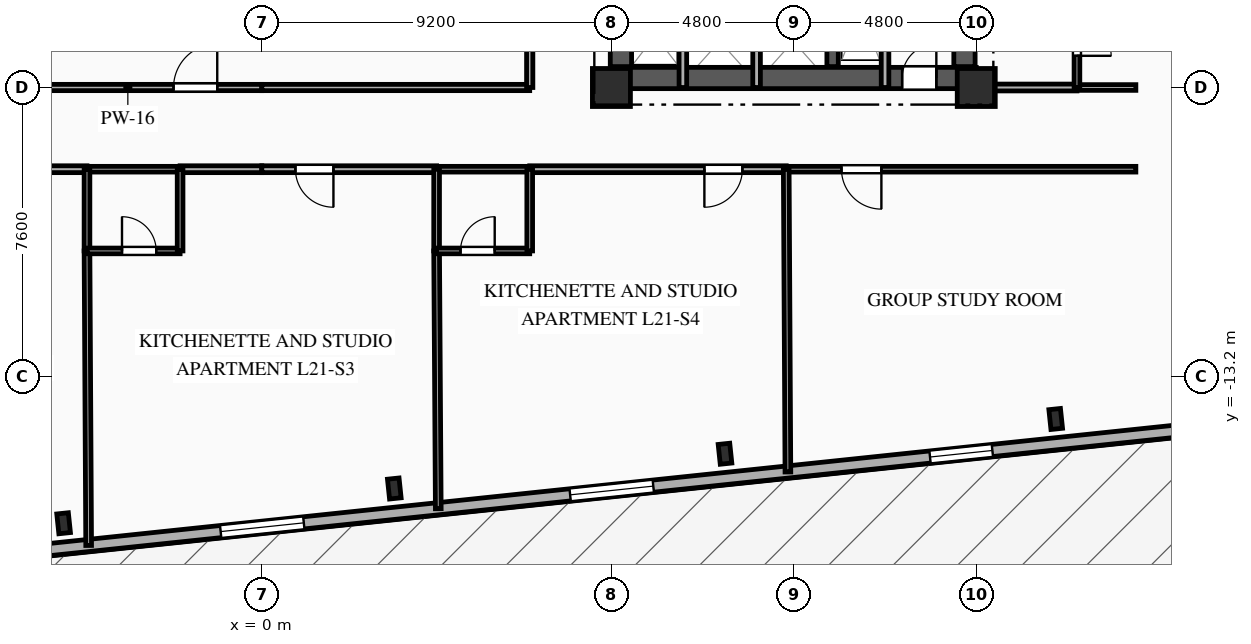
"""IFC4 building model, lengths in metres.
Left out: names, types, materials, properties, quantities, classifications, styles, units other than length and angle.
Written with IfcOpenShell. Run it as: python <this file> out.ifc"""

import sys

from ifc_helpers import new_model, si_unit, direction, frame, frame_2d, origin, origin_2d, place, context, subcontext, project, spatial, rectangle, i_section, extrude, element, fill, save


model = new_model("IFC4")
c1 = context("Model", 3, precision=1e-05, world=origin(), true_north=direction((0.0, 1.0)))
c2 = subcontext(c1, "Body", "Model", "MODEL_VIEW")
j1 = project(units=[si_unit("LENGTHUNIT", "METRE"), si_unit("PLANEANGLEUNIT", "RADIAN")], contexts=[c1])
p1 = place(None, origin())
s1 = spatial("IfcSite", under=j1, at=p1, CompositionType="ELEMENT")
p2 = place(p1, origin())
s2 = spatial("IfcBuilding", under=s1, at=p2, CompositionType="ELEMENT")
p3 = place(p2, frame((0.0, 0.0, 79.0)))
s3 = spatial("IfcBuildingStorey", under=s2, at=p3, CompositionType="ELEMENT", Elevation=79.0)
for number, where, z_axis, x_axis in (
    (1, (9.2, -5.6, 0.0), (0.0, 0.0, 1.0), (1.0, 0.0, 0.0)),
    (2, (18.8, -5.6, 0.0), (0.0, 0.0, 1.0), (1.0, 0.0, 0.0)),
):
    element("IfcColumn", number, at=place(p3, frame(where, z_axis=z_axis, x_axis=x_axis)), inside=s3, PredefinedType="COLUMN", context=c2, shape_type="SweptSolid", body=[
        extrude(rectangle(XDim=1.0, YDim=1.0, at=origin_2d()), origin(), (0.0, 0.0, 1.0), 3.35),
    ])
for number, where, z_axis, x_axis in (
    (3, (-5.215, -17.066, 0.0), (0.0, 0.0, 1.0), (0.995, 0.105, 0.0)),
    (4, (3.487, -16.151, 0.0), (0.0, 0.0, 1.0), (0.995, 0.105, 0.0)),
    (5, (12.189, -15.237, 0.0), (0.0, 0.0, 1.0), (0.995, 0.105, 0.0)),
    (6, (20.891, -14.322, 0.0), (0.0, 0.0, 1.0), (0.995, 0.105, 0.0)),
):
    element("IfcColumn", number, at=place(p3, frame(where, z_axis=z_axis, x_axis=x_axis)), inside=s3, PredefinedType="COLUMN", context=c2, shape_type="SweptSolid", body=[
        extrude(i_section(OverallWidth=0.306, OverallDepth=0.524, WebThickness=0.021, FlangeThickness=0.04, FilletRadius=0.027, at=origin_2d()), origin(), (0.0, 0.0, 1.0), 3.35),
    ])
p4 = place(p3, frame((30.307, -13.986, 0.0), z_axis=(0.0, 0.0, 1.0), x_axis=(-0.994521628355, -0.104531003701, 0.0)))
e7 = element("IfcWall", 7, at=p4, inside=s3, PredefinedType="SOLIDWALL", context=c2, shape_type="SweptSolid", body=[
    extrude(rectangle(XDim=53.8, YDim=0.32, at=frame_2d((26.9, 0.0))), origin(), (0.0, 0.0, 1.0), 3.045),
])
p5 = place(p4, frame((11.144, 0.0, 0.85)))
e8 = element("IfcOpeningElement", 8, at=p5, cuts=e7, PredefinedType="OPENING", context=c2, shape_type="SweptSolid", body=[
    extrude(rectangle(XDim=1.65, YDim=1.85, at=frame_2d((0.825, 0.925))), frame((0.0, 0.17, 0.0), z_axis=(0.0, -1.0, 0.0), x_axis=(1.0, 0.0, 0.0)), (0.0, 0.0, 1.0), 0.34),
])
p6 = place(p4, frame((20.116, 0.0, 0.85)))
e9 = element("IfcOpeningElement", 9, at=p6, cuts=e7, PredefinedType="OPENING", context=c2, shape_type="SweptSolid", body=[
    extrude(rectangle(XDim=2.2, YDim=1.85, at=frame_2d((1.1, 0.925))), frame((0.0, 0.17, 0.0), z_axis=(0.0, -1.0, 0.0), x_axis=(1.0, 0.0, 0.0)), (0.0, 0.0, 1.0), 0.34),
])
p7 = place(p4, frame((29.363, 0.0, 0.85)))
e10 = element("IfcOpeningElement", 10, at=p7, cuts=e7, PredefinedType="OPENING", context=c2, shape_type="SweptSolid", body=[
    extrude(rectangle(XDim=2.2, YDim=1.85, at=frame_2d((1.1, 0.925))), frame((0.0, 0.17, 0.0), z_axis=(0.0, -1.0, 0.0), x_axis=(1.0, 0.0, 0.0)), (0.0, 0.0, 1.0), 0.34),
])
p8 = place(p4, frame((38.61, 0.0, 0.85)))
e11 = element("IfcOpeningElement", 11, at=p8, cuts=e7, PredefinedType="OPENING", context=c2, shape_type="SweptSolid", body=[
    extrude(rectangle(XDim=2.2, YDim=1.85, at=frame_2d((1.1, 0.925))), frame((0.0, 0.17, 0.0), z_axis=(0.0, -1.0, 0.0), x_axis=(1.0, 0.0, 0.0)), (0.0, 0.0, 1.0), 0.34),
])
p9 = place(p4, frame((45.85, 0.0, 0.85)))
e12 = element("IfcOpeningElement", 12, at=p9, cuts=e7, PredefinedType="OPENING", context=c2, shape_type="SweptSolid", body=[
    extrude(rectangle(XDim=1.65, YDim=1.85, at=frame_2d((0.825, 0.925))), frame((0.0, 0.17, 0.0), z_axis=(0.0, -1.0, 0.0), x_axis=(1.0, 0.0, 0.0)), (0.0, 0.0, 1.0), 0.34),
])
p10 = place(p4, frame((50.373, 0.0, 0.85)))
e13 = element("IfcOpeningElement", 13, at=p10, cuts=e7, PredefinedType="OPENING", context=c2, shape_type="SweptSolid", body=[
    extrude(rectangle(XDim=1.65, YDim=1.85, at=frame_2d((0.825, 0.925))), frame((0.0, 0.17, 0.0), z_axis=(0.0, -1.0, 0.0), x_axis=(1.0, 0.0, 0.0)), (0.0, 0.0, 1.0), 0.34),
])
p11 = place(p3, frame((9.2, -5.35, 0.0), z_axis=(0.0, 0.0, 1.0), x_axis=(1.0, 0.0, 0.0)))
e14 = element("IfcWall", 14, at=p11, inside=s3, PredefinedType="SHEAR", context=c2, shape_type="SweptSolid", body=[
    extrude(rectangle(XDim=9.6, YDim=0.56, at=frame_2d((4.8, 0.0))), origin(), (0.0, 0.0, 1.0), 3.045),
])
p12 = place(p11, frame((7.65, 0.0, 0.0)))
e15 = element("IfcOpeningElement", 15, at=p12, cuts=e14, PredefinedType="OPENING", context=c2, shape_type="SweptSolid", body=[
    extrude(rectangle(XDim=0.9, YDim=2.1, at=frame_2d((0.45, 1.05))), frame((0.0, 0.29, 0.0), z_axis=(0.0, -1.0, 0.0), x_axis=(1.0, 0.0, 0.0)), (0.0, 0.0, 1.0), 0.58),
])
p13 = place(p3, frame((9.45, -5.05, 0.0), z_axis=(0.0, 0.0, 1.0), x_axis=(0.0, 1.0, 0.0)))
e16 = element("IfcWall", 16, at=p13, inside=s3, PredefinedType="SHEAR", context=c2, shape_type="SweptSolid", body=[
    extrude(rectangle(XDim=10.1, YDim=0.56, at=frame_2d((5.05, 0.0))), origin(), (0.0, 0.0, 1.0), 3.045),
])
p14 = place(p13, frame((7.15, 0.0, 0.0)))
e17 = element("IfcOpeningElement", 17, at=p14, cuts=e16, PredefinedType="OPENING", context=c2, shape_type="SweptSolid", body=[
    extrude(rectangle(XDim=0.9, YDim=2.1, at=frame_2d((0.45, 1.05))), frame((0.0, 0.29, 0.0), z_axis=(0.0, -1.0, 0.0), x_axis=(1.0, 0.0, 0.0)), (0.0, 0.0, 1.0), 0.58),
])
p15 = place(p13, frame((2.4, 0.0, 0.0)))
e18 = element("IfcOpeningElement", 18, at=p15, cuts=e16, PredefinedType="OPENING", context=c2, shape_type="SweptSolid", body=[
    extrude(rectangle(XDim=1.2, YDim=2.15, at=frame_2d((0.6, 1.075))), frame((0.0, 0.29, 0.0), z_axis=(0.0, -1.0, 0.0), x_axis=(1.0, 0.0, 0.0)), (0.0, 0.0, 1.0), 0.58),
])
p16 = place(p3, frame((18.49, -5.05, 0.0), z_axis=(0.0, 0.0, 1.0), x_axis=(0.0, 1.0, 0.0)))
e19 = element("IfcWall", 19, at=p16, inside=s3, PredefinedType="SHEAR", context=c2, shape_type="SweptSolid", body=[
    extrude(rectangle(XDim=10.1, YDim=0.56, at=frame_2d((5.05, 0.0))), origin(), (0.0, 0.0, 1.0), 3.045),
])
p17 = place(p3, frame((15.02, -5.05, 0.0), z_axis=(0.0, 0.0, 1.0), x_axis=(0.0, 1.0, 0.0)))
e20 = element("IfcWall", 20, at=p17, inside=s3, PredefinedType="SHEAR", context=c2, shape_type="SweptSolid", body=[
    extrude(rectangle(XDim=10.1, YDim=0.3, at=frame_2d((5.05, 0.0))), origin(), (0.0, 0.0, 1.0), 3.045),
])
p18 = place(p3, frame((16.4, -2.11, 0.0), z_axis=(0.0, 0.0, 1.0), x_axis=(0.0, -1.0, 0.0)))
e21 = element("IfcWall", 21, at=p18, inside=s3, PredefinedType="PARTITIONING", context=c2, shape_type="SweptSolid", body=[
    extrude(rectangle(XDim=3.49, YDim=0.2, at=frame_2d((1.745, 0.0))), origin(), (0.0, 0.0, 1.0), 3.045),
])
for number, where, z_axis, x_axis in (
    (22, (11.08, -5.6, 0.0), (0.0, 0.0, 1.0), (0.0, 1.0, 0.0)),
    (23, (13.02, -5.6, 0.0), (0.0, 0.0, 1.0), (0.0, 1.0, 0.0)),
):
    element("IfcWall", number, at=place(p3, frame(where, z_axis=z_axis, x_axis=x_axis)), inside=s3, PredefinedType="PARTITIONING", context=c2, shape_type="SweptSolid", body=[
        extrude(rectangle(XDim=2.25, YDim=0.2, at=frame_2d((1.125, 0.0))), origin(), (0.0, 0.0, 1.0), 3.045),
    ])
p19 = place(p3, frame((-4.6, -7.75, 0.0), z_axis=(0.0, 0.0, 1.0), x_axis=(-1.0, 0.0, 0.0)))
e24 = element("IfcWall", 24, at=p19, inside=s3, PredefinedType="PARTITIONING", context=c2, shape_type="SweptSolid", body=[
    extrude(rectangle(XDim=6.75, YDim=0.18, at=frame_2d((3.375, 0.0))), origin(), (0.0, 0.0, 1.0), 3.045),
])
p20 = place(p19, frame((1.154, 0.0, 0.0)))
e25 = element("IfcOpeningElement", 25, at=p20, cuts=e24, PredefinedType="OPENING", context=c2, shape_type="SweptSolid", body=[
    extrude(rectangle(XDim=1.0, YDim=2.15, at=frame_2d((0.5, 1.075))), frame((0.0, 0.1, 0.0), z_axis=(0.0, -1.0, 0.0), x_axis=(1.0, 0.0, 0.0)), (0.0, 0.0, 1.0), 0.2),
])
p21 = place(p3, frame((0.0, -7.75, 0.0), z_axis=(0.0, 0.0, 1.0), x_axis=(-1.0, 0.0, 0.0)))
e26 = element("IfcWall", 26, at=p21, inside=s3, PredefinedType="PARTITIONING", context=c2, shape_type="SweptSolid", body=[
    extrude(rectangle(XDim=2.15, YDim=0.18, at=frame_2d((1.075, 0.0))), origin(), (0.0, 0.0, 1.0), 3.045),
])
p22 = place(p3, frame((-2.15, -7.75, 0.0), z_axis=(0.0, 0.0, 1.0), x_axis=(-1.0, 0.0, 0.0)))
e27 = element("IfcWall", 27, at=p22, inside=s3, PredefinedType="PLUMBINGWALL", context=c2, shape_type="SweptSolid", body=[
    extrude(rectangle(XDim=2.45, YDim=0.15, at=frame_2d((1.225, 0.0))), origin(), (0.0, 0.0, 1.0), 3.045),
])
p23 = place(p3, frame((-7.05, -5.6, 0.0), z_axis=(0.0, 0.0, 1.0), x_axis=(1.0, 0.0, 0.0)))
e28 = element("IfcWall", 28, at=p23, inside=s3, PredefinedType="PARTITIONING", context=c2, shape_type="SweptSolid", body=[
    extrude(rectangle(XDim=7.05, YDim=0.165, at=frame_2d((3.525, 0.0))), origin(), (0.0, 0.0, 1.0), 2.53),
])
p24 = place(p23, frame((4.728, 0.0, 0.0)))
e29 = element("IfcOpeningElement", 29, at=p24, cuts=e28, PredefinedType="OPENING", context=c2, shape_type="SweptSolid", body=[
    extrude(rectangle(XDim=1.15, YDim=2.15, at=frame_2d((0.575, 1.075))), frame((0.0, 0.093, 0.0), z_axis=(0.0, -1.0, 0.0), x_axis=(1.0, 0.0, 0.0)), (0.0, 0.0, 1.0), 0.185),
])
p25 = place(p3, frame((18.8, -5.6, 0.0), z_axis=(0.0, 0.0, 1.0), x_axis=(1.0, 0.0, 0.0)))
e30 = element("IfcWall", 30, at=p25, inside=s3, PredefinedType="PARTITIONING", context=c2, shape_type="SweptSolid", body=[
    extrude(rectangle(XDim=2.65, YDim=0.18, at=frame_2d((1.325, 0.0))), origin(), (0.0, 0.0, 1.0), 2.53),
])
p26 = place(p3, frame((21.45, -5.6, 0.0), z_axis=(0.0, 0.0, 1.0), x_axis=(1.0, 0.0, 0.0)))
e31 = element("IfcWall", 31, at=p26, inside=s3, PredefinedType="PLUMBINGWALL", context=c2, shape_type="SweptSolid", body=[
    extrude(rectangle(XDim=1.55, YDim=0.15, at=frame_2d((0.775, 0.0))), origin(), (0.0, 0.0, 1.0), 3.045),
])
p27 = place(p3, frame((4.6, -7.75, 0.0), z_axis=(0.0, 0.0, 1.0), x_axis=(-1.0, 0.0, 0.0)))
e32 = element("IfcWall", 32, at=p27, inside=s3, PredefinedType="PARTITIONING", context=c2, shape_type="SweptSolid", body=[
    extrude(rectangle(XDim=4.6, YDim=0.18, at=frame_2d((2.3, 0.0))), origin(), (0.0, 0.0, 1.0), 3.045),
])
p28 = place(p27, frame((2.715, 0.0, 0.0)))
e33 = element("IfcOpeningElement", 33, at=p28, cuts=e32, PredefinedType="OPENING", context=c2, shape_type="SweptSolid", body=[
    extrude(rectangle(XDim=1.0, YDim=2.15, at=frame_2d((0.5, 1.075))), frame((0.0, 0.1, 0.0), z_axis=(0.0, -1.0, 0.0), x_axis=(1.0, 0.0, 0.0)), (0.0, 0.0, 1.0), 0.2),
])
p29 = place(p3, frame((13.8, -7.75, 0.0), z_axis=(0.0, 0.0, 1.0), x_axis=(-1.0, 0.0, 0.0)))
e34 = element("IfcWall", 34, at=p29, inside=s3, PredefinedType="PARTITIONING", context=c2, shape_type="SweptSolid", body=[
    extrude(rectangle(XDim=6.75, YDim=0.18, at=frame_2d((3.375, 0.0))), origin(), (0.0, 0.0, 1.0), 3.045),
])
p30 = place(p29, frame((1.154, 0.0, 0.0)))
e35 = element("IfcOpeningElement", 35, at=p30, cuts=e34, PredefinedType="OPENING", context=c2, shape_type="SweptSolid", body=[
    extrude(rectangle(XDim=1.0, YDim=2.15, at=frame_2d((0.5, 1.075))), frame((0.0, 0.1, 0.0), z_axis=(0.0, -1.0, 0.0), x_axis=(1.0, 0.0, 0.0)), (0.0, 0.0, 1.0), 0.2),
])
p31 = place(p3, frame((7.05, -7.75, 0.0), z_axis=(0.0, 0.0, 1.0), x_axis=(-1.0, 0.0, 0.0)))
e36 = element("IfcWall", 36, at=p31, inside=s3, PredefinedType="PLUMBINGWALL", context=c2, shape_type="SweptSolid", body=[
    extrude(rectangle(XDim=2.45, YDim=0.15, at=frame_2d((1.225, 0.0))), origin(), (0.0, 0.0, 1.0), 3.045),
])
p32 = place(p3, frame((23.0, -7.75, 0.0), z_axis=(0.0, 0.0, 1.0), x_axis=(-1.0, 0.0, 0.0)))
e37 = element("IfcWall", 37, at=p32, inside=s3, PredefinedType="PARTITIONING", context=c2, shape_type="SweptSolid", body=[
    extrude(rectangle(XDim=9.2, YDim=0.15, at=frame_2d((4.6, 0.0))), origin(), (0.0, 0.0, 1.0), 3.045),
])
p33 = place(p32, frame((6.696, 0.0, 0.0)))
e38 = element("IfcOpeningElement", 38, at=p33, cuts=e37, PredefinedType="OPENING", context=c2, shape_type="SweptSolid", body=[
    extrude(rectangle(XDim=1.05, YDim=2.15, at=frame_2d((0.525, 1.075))), frame((0.0, 0.085, 0.0), z_axis=(0.0, -1.0, 0.0), x_axis=(1.0, 0.0, 0.0)), (0.0, 0.0, 1.0), 0.17),
])
p34 = place(p3, frame((0.0, -5.6, 0.0), z_axis=(0.0, 0.0, 1.0), x_axis=(1.0, 0.0, 0.0)))
e39 = element("IfcWall", 39, at=p34, inside=s3, PredefinedType="PARTITIONING", context=c2, shape_type="SweptSolid", body=[
    extrude(rectangle(XDim=7.05, YDim=0.165, at=frame_2d((3.525, 0.0))), origin(), (0.0, 0.0, 1.0), 2.53),
])
p35 = place(p3, frame((7.05, -5.6, 0.0), z_axis=(0.0, 0.0, 1.0), x_axis=(0.0, 1.0, 0.0)))
e40 = element("IfcWall", 40, at=p35, inside=s3, PredefinedType="PARTITIONING", context=c2, shape_type="SweptSolid", body=[
    extrude(rectangle(XDim=7.05, YDim=0.165, at=frame_2d((3.525, 0.0))), origin(), (0.0, 0.0, 1.0), 3.045),
])
p36 = place(p3, frame((21.45, -3.25, 0.0), z_axis=(0.0, 0.0, 1.0), x_axis=(0.0, -1.0, 0.0)))
e41 = element("IfcWall", 41, at=p36, inside=s3, PredefinedType="PLUMBINGWALL", context=c2, shape_type="SweptSolid", body=[
    extrude(rectangle(XDim=2.35, YDim=0.15, at=frame_2d((1.175, 0.0))), origin(), (0.0, 0.0, 1.0), 3.045),
])
p37 = place(p36, frame((0.616, 0.0, 0.0)))
e42 = element("IfcOpeningElement", 42, at=p37, cuts=e41, PredefinedType="OPENING", context=c2, shape_type="SweptSolid", body=[
    extrude(rectangle(XDim=0.9, YDim=2.1, at=frame_2d((0.45, 1.05))), frame((0.0, 0.085, 0.0), z_axis=(0.0, -1.0, 0.0), x_axis=(1.0, 0.0, 0.0)), (0.0, 0.0, 1.0), 0.17),
])
p38 = place(p3, frame((-4.6, -9.9, 0.0), z_axis=(0.0, 0.0, 1.0), x_axis=(0.005670271746, -0.99998392388, 0.0)))
e43 = element("IfcWall", 43, at=p38, inside=s3, PredefinedType="PARTITIONING", context=c2, shape_type="SweptSolid", body=[
    extrude(rectangle(XDim=7.75, YDim=0.15, at=frame_2d((3.875, 0.0))), origin(), (0.0, 0.0, 1.0), 3.045),
])
p39 = place(p3, frame((-4.6, -7.75, 0.0), z_axis=(0.0, 0.0, 1.0), x_axis=(0.0, -1.0, 0.0)))
e44 = element("IfcWall", 44, at=p39, inside=s3, PredefinedType="PLUMBINGWALL", context=c2, shape_type="SweptSolid", body=[
    extrude(rectangle(XDim=2.15, YDim=0.15, at=frame_2d((1.075, 0.0))), origin(), (0.0, 0.0, 1.0), 3.045),
])
p40 = place(p3, frame((-4.6, -9.9, 0.0), z_axis=(0.0, 0.0, 1.0), x_axis=(1.0, 0.0, 0.0)))
e45 = element("IfcWall", 45, at=p40, inside=s3, PredefinedType="PLUMBINGWALL", context=c2, shape_type="SweptSolid", body=[
    extrude(rectangle(XDim=2.45, YDim=0.15, at=frame_2d((1.225, 0.0))), origin(), (0.0, 0.0, 1.0), 3.045),
])
p41 = place(p40, frame((0.921, 0.0, 0.0)))
e46 = element("IfcOpeningElement", 46, at=p41, cuts=e45, PredefinedType="OPENING", context=c2, shape_type="SweptSolid", body=[
    extrude(rectangle(XDim=0.9, YDim=2.1, at=frame_2d((0.45, 1.05))), frame((0.0, 0.085, 0.0), z_axis=(0.0, -1.0, 0.0), x_axis=(1.0, 0.0, 0.0)), (0.0, 0.0, 1.0), 0.17),
])
p42 = place(p3, frame((-2.15, -9.9, 0.0), z_axis=(0.0, 0.0, 1.0), x_axis=(0.0, 1.0, 0.0)))
e47 = element("IfcWall", 47, at=p42, inside=s3, PredefinedType="PLUMBINGWALL", context=c2, shape_type="SweptSolid", body=[
    extrude(rectangle(XDim=2.15, YDim=0.15, at=frame_2d((1.075, 0.0))), origin(), (0.0, 0.0, 1.0), 3.045),
])
p43 = place(p3, frame((4.6, -9.9, 0.0), z_axis=(0.0, 0.0, 1.0), x_axis=(0.006442423167, -0.999979247377, 0.0)))
e48 = element("IfcWall", 48, at=p43, inside=s3, PredefinedType="PARTITIONING", context=c2, shape_type="SweptSolid", body=[
    extrude(rectangle(XDim=6.783, YDim=0.15, at=frame_2d((3.392, 0.0))), origin(), (0.0, 0.0, 1.0), 3.045),
])
p44 = place(p3, frame((4.6, -7.75, 0.0), z_axis=(0.0, 0.0, 1.0), x_axis=(0.0, -1.0, 0.0)))
e49 = element("IfcWall", 49, at=p44, inside=s3, PredefinedType="PLUMBINGWALL", context=c2, shape_type="SweptSolid", body=[
    extrude(rectangle(XDim=2.15, YDim=0.15, at=frame_2d((1.075, 0.0))), origin(), (0.0, 0.0, 1.0), 3.045),
])
p45 = place(p3, frame((4.6, -9.9, 0.0), z_axis=(0.0, 0.0, 1.0), x_axis=(1.0, 0.0, 0.0)))
e50 = element("IfcWall", 50, at=p45, inside=s3, PredefinedType="PLUMBINGWALL", context=c2, shape_type="SweptSolid", body=[
    extrude(rectangle(XDim=2.45, YDim=0.15, at=frame_2d((1.225, 0.0))), origin(), (0.0, 0.0, 1.0), 3.045),
])
p46 = place(p45, frame((0.629, 0.0, 0.0)))
e51 = element("IfcOpeningElement", 51, at=p46, cuts=e50, PredefinedType="OPENING", context=c2, shape_type="SweptSolid", body=[
    extrude(rectangle(XDim=0.9, YDim=2.1, at=frame_2d((0.45, 1.05))), frame((0.0, 0.085, 0.0), z_axis=(0.0, -1.0, 0.0), x_axis=(1.0, 0.0, 0.0)), (0.0, 0.0, 1.0), 0.17),
])
p47 = place(p3, frame((7.05, -9.9, 0.0), z_axis=(0.0, 0.0, 1.0), x_axis=(0.0, 1.0, 0.0)))
e52 = element("IfcWall", 52, at=p47, inside=s3, PredefinedType="PLUMBINGWALL", context=c2, shape_type="SweptSolid", body=[
    extrude(rectangle(XDim=2.15, YDim=0.15, at=frame_2d((1.075, 0.0))), origin(), (0.0, 0.0, 1.0), 3.045),
])
p48 = place(p3, frame((13.8, -7.75, 0.0), z_axis=(0.0, 0.0, 1.0), x_axis=(0.005516481079, -0.999984784102, 0.0)))
e53 = element("IfcWall", 53, at=p48, inside=s3, PredefinedType="PARTITIONING", context=c2, shape_type="SweptSolid", body=[
    extrude(rectangle(XDim=7.966, YDim=0.15, at=frame_2d((3.983, 0.0))), origin(), (0.0, 0.0, 1.0), 3.045),
])
p49 = place(p5, origin())
e54 = element("IfcWindow", 54, at=p49, inside=s3, PartitioningType="SINGLE_PANEL", PredefinedType="WINDOW", context=c2, shape_type="SweptSolid", body=[
    extrude(rectangle(XDim=1.65, YDim=1.85, at=frame_2d((0.825, 0.925))), frame((0.0, 0.03, 0.0), z_axis=(0.0, -1.0, 0.0), x_axis=(1.0, 0.0, 0.0)), (0.0, 0.0, 1.0), 0.06),
])
fill(e8, e54)
p50 = place(p6, origin())
e55 = element("IfcWindow", 55, at=p50, inside=s3, PartitioningType="SINGLE_PANEL", PredefinedType="WINDOW", context=c2, shape_type="SweptSolid", body=[
    extrude(rectangle(XDim=2.2, YDim=1.85, at=frame_2d((1.1, 0.925))), frame((0.0, 0.03, 0.0), z_axis=(0.0, -1.0, 0.0), x_axis=(1.0, 0.0, 0.0)), (0.0, 0.0, 1.0), 0.06),
])
fill(e9, e55)
p51 = place(p7, origin())
e56 = element("IfcWindow", 56, at=p51, inside=s3, PartitioningType="SINGLE_PANEL", PredefinedType="WINDOW", context=c2, shape_type="SweptSolid", body=[
    extrude(rectangle(XDim=2.2, YDim=1.85, at=frame_2d((1.1, 0.925))), frame((0.0, 0.03, 0.0), z_axis=(0.0, -1.0, 0.0), x_axis=(1.0, 0.0, 0.0)), (0.0, 0.0, 1.0), 0.06),
])
fill(e10, e56)
p52 = place(p12, origin())
e57 = element("IfcDoor", 57, at=p52, inside=s3, OperationType="SINGLE_SWING_RIGHT", PredefinedType="DOOR", context=c2, shape_type="SweptSolid", body=[
    extrude(rectangle(XDim=0.9, YDim=2.1, at=frame_2d((0.45, 1.05))), frame((0.0, 0.025, 0.0), z_axis=(0.0, -1.0, 0.0), x_axis=(1.0, 0.0, 0.0)), (0.0, 0.0, 1.0), 0.05),
])
fill(e15, e57)
p53 = place(p24, origin())
e58 = element("IfcDoor", 58, at=p53, inside=s3, OperationType="SINGLE_SWING_RIGHT", PredefinedType="DOOR", context=c2, shape_type="SweptSolid", body=[
    extrude(rectangle(XDim=1.15, YDim=2.15, at=frame_2d((0.575, 1.075))), frame((0.0, 0.025, 0.0), z_axis=(0.0, -1.0, 0.0), x_axis=(1.0, 0.0, 0.0)), (0.0, 0.0, 1.0), 0.05),
])
fill(e29, e58)
p54 = place(p28, origin())
e59 = element("IfcDoor", 59, at=p54, inside=s3, OperationType="SINGLE_SWING_LEFT", PredefinedType="DOOR", context=c2, shape_type="SweptSolid", body=[
    extrude(rectangle(XDim=1.0, YDim=2.15, at=frame_2d((0.5, 1.075))), frame((0.0, 0.025, 0.0), z_axis=(0.0, -1.0, 0.0), x_axis=(1.0, 0.0, 0.0)), (0.0, 0.0, 1.0), 0.05),
])
fill(e33, e59)
p55 = place(p30, origin())
e60 = element("IfcDoor", 60, at=p55, inside=s3, OperationType="SINGLE_SWING_RIGHT", PredefinedType="DOOR", context=c2, shape_type="SweptSolid", body=[
    extrude(rectangle(XDim=1.0, YDim=2.15, at=frame_2d((0.5, 1.075))), frame((0.0, 0.025, 0.0), z_axis=(0.0, -1.0, 0.0), x_axis=(1.0, 0.0, 0.0)), (0.0, 0.0, 1.0), 0.05),
])
fill(e35, e60)
p56 = place(p33, origin())
e61 = element("IfcDoor", 61, at=p56, inside=s3, OperationType="SINGLE_SWING_LEFT", PredefinedType="DOOR", context=c2, shape_type="SweptSolid", body=[
    extrude(rectangle(XDim=1.05, YDim=2.15, at=frame_2d((0.525, 1.075))), frame((0.0, 0.025, 0.0), z_axis=(0.0, -1.0, 0.0), x_axis=(1.0, 0.0, 0.0)), (0.0, 0.0, 1.0), 0.05),
])
fill(e38, e61)
p57 = place(p37, origin())
e62 = element("IfcDoor", 62, at=p57, inside=s3, OperationType="SINGLE_SWING_RIGHT", PredefinedType="DOOR", context=c2, shape_type="SweptSolid", body=[
    extrude(rectangle(XDim=0.9, YDim=2.1, at=frame_2d((0.45, 1.05))), frame((0.0, 0.025, 0.0), z_axis=(0.0, -1.0, 0.0), x_axis=(1.0, 0.0, 0.0)), (0.0, 0.0, 1.0), 0.05),
])
fill(e42, e62)
p58 = place(p41, origin())
e63 = element("IfcDoor", 63, at=p58, inside=s3, OperationType="SINGLE_SWING_LEFT", PredefinedType="DOOR", context=c2, shape_type="SweptSolid", body=[
    extrude(rectangle(XDim=0.9, YDim=2.1, at=frame_2d((0.45, 1.05))), frame((0.0, 0.025, 0.0), z_axis=(0.0, -1.0, 0.0), x_axis=(1.0, 0.0, 0.0)), (0.0, 0.0, 1.0), 0.05),
])
fill(e46, e63)
p59 = place(p46, origin())
e64 = element("IfcDoor", 64, at=p59, inside=s3, OperationType="SINGLE_SWING_RIGHT", PredefinedType="DOOR", context=c2, shape_type="SweptSolid", body=[
    extrude(rectangle(XDim=0.9, YDim=2.1, at=frame_2d((0.45, 1.05))), frame((0.0, 0.025, 0.0), z_axis=(0.0, -1.0, 0.0), x_axis=(1.0, 0.0, 0.0)), (0.0, 0.0, 1.0), 0.05),
])
fill(e51, e64)
save(model, sys.argv[1])
